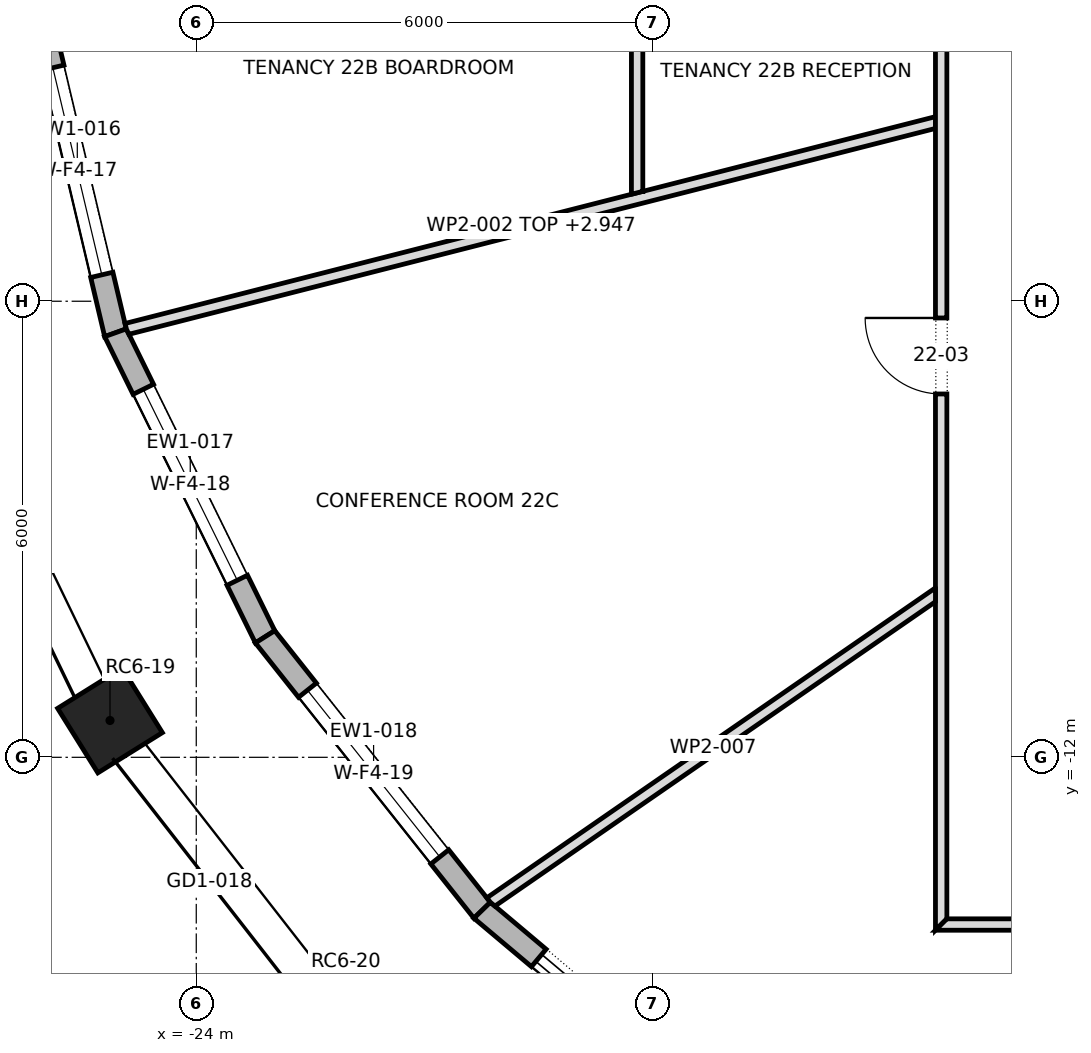
"""IFC4 building model, lengths in metres.
Left out: names, types, materials, properties, quantities, classifications, styles, units other than length and angle.
Written with IfcOpenShell. Run it as: python <this file> out.ifc"""

import sys

from ifc_helpers import new_model, si_unit, direction, frame, frame_2d, origin, origin_2d, place, context, subcontext, project, spatial, polyline, rectangle, outline, extrude, element, fill, save


model = new_model("IFC4")
c1 = context("Model", 3, precision=1e-05, world=origin(), true_north=direction((0.0, 1.0)))
c2 = subcontext(c1, "Body", "Model", "MODEL_VIEW")
j1 = project(units=[si_unit("LENGTHUNIT", "METRE"), si_unit("PLANEANGLEUNIT", "RADIAN")], contexts=[c1])
p1 = place(None, origin())
s1 = spatial("IfcSite", under=j1, at=p1, CompositionType="ELEMENT")
p2 = place(p1, origin())
s2 = spatial("IfcBuilding", under=s1, at=p2, CompositionType="ELEMENT")
p3 = place(p2, frame((0.0, 0.0, 312.3)))
s3 = spatial("IfcBuildingStorey", under=s2, at=p3, CompositionType="ELEMENT", Elevation=312.3)
for number, where, z_axis, x_axis in (
    (1, (-25.135, -11.516, 0.0), (0.0, 0.0, 1.0), (0.529, -0.849, 0.0)),
    (2, (-22.031, -15.497, 0.0), (0.0, 0.0, 1.0), (0.692, -0.722, 0.0)),
):
    element("IfcColumn", number, at=place(p3, frame(where, z_axis=z_axis, x_axis=x_axis)), inside=s3, PredefinedType="COLUMN", context=c2, shape_type="SweptSolid", body=[
        extrude(rectangle(XDim=1.0, YDim=1.0, at=origin_2d()), origin(), (0.0, 0.0, 1.0), 4.0),
    ])
p4 = place(p3, frame((-26.067, -2.166, 0.0), z_axis=(0.0, 0.0, 1.0), x_axis=(0.229974411334, -0.973196675977, 0.0)))
e3 = element("IfcWall", 3, at=p4, inside=s3, PredefinedType="STANDARD", context=c2, shape_type="SweptSolid", body=[
    extrude(outline(polyline([(-0.018, -0.15), (4.382, -0.15), (4.348, 0.15), (0.018, 0.15), (-0.018, -0.15)])), origin(), (0.0, 0.0, 1.0), 3.7),
])
p5 = place(p4, frame((0.783, 0.0, 0.6)))
e4 = element("IfcOpeningElement", 4, at=p5, cuts=e3, PredefinedType="OPENING", context=c2, shape_type="SweptSolid", body=[
    extrude(rectangle(XDim=2.8, YDim=2.65, at=frame_2d((1.4, 1.325))), frame((0.0, 0.162, 0.0), z_axis=(0.0, -1.0, 0.0), x_axis=(1.0, 0.0, 0.0)), (0.0, 0.0, 1.0), 0.324),
])
p6 = place(p3, frame((-25.063, -6.415, 0.0), z_axis=(0.0, 0.0, 1.0), x_axis=(0.441509050872, -0.897256796017, 0.0)))
e5 = element("IfcWall", 5, at=p6, inside=s3, PredefinedType="STANDARD", context=c2, shape_type="SweptSolid", body=[
    extrude(outline(polyline([(-0.017, -0.15), (4.474, -0.15), (4.442, 0.15), (0.017, 0.15), (-0.017, -0.15)])), origin(), (0.0, 0.0, 1.0), 3.7),
])
p7 = place(p6, frame((0.829, 0.0, 0.6)))
e6 = element("IfcOpeningElement", 6, at=p7, cuts=e5, PredefinedType="OPENING", context=c2, shape_type="SweptSolid", body=[
    extrude(rectangle(XDim=2.8, YDim=2.65, at=frame_2d((1.4, 1.325))), frame((0.0, 0.162, 0.0), z_axis=(0.0, -1.0, 0.0), x_axis=(1.0, 0.0, 0.0)), (0.0, 0.0, 1.0), 0.324),
])
p8 = place(p3, frame((-23.094, -10.415, 0.0), z_axis=(0.0, 0.0, 1.0), x_axis=(0.621682706372, -0.78326918272, 0.0)))
e7 = element("IfcWall", 7, at=p8, inside=s3, PredefinedType="STANDARD", context=c2, shape_type="SweptSolid", body=[
    extrude(outline(polyline([(-0.016, -0.15), (4.608, -0.15), (4.578, 0.15), (0.016, 0.15), (-0.016, -0.15)])), origin(), (0.0, 0.0, 1.0), 3.7),
])
p9 = place(p8, frame((0.896, 0.0, 0.6)))
e8 = element("IfcOpeningElement", 8, at=p9, cuts=e7, PredefinedType="OPENING", context=c2, shape_type="SweptSolid", body=[
    extrude(rectangle(XDim=2.8, YDim=2.65, at=frame_2d((1.4, 1.325))), frame((0.0, 0.162, 0.0), z_axis=(0.0, -1.0, 0.0), x_axis=(1.0, 0.0, 0.0)), (0.0, 0.0, 1.0), 0.324),
])
p10 = place(p3, frame((-20.239, -14.012, 0.0), z_axis=(0.0, 0.0, 1.0), x_axis=(0.765059193792, -0.643959959931, 0.0)))
e9 = element("IfcWall", 9, at=p10, inside=s3, PredefinedType="STANDARD", context=c2, shape_type="SweptSolid", body=[
    extrude(outline(polyline([(-0.015, -0.15), (4.762, -0.15), (4.734, 0.15), (0.015, 0.15), (-0.015, -0.15)])), origin(), (0.0, 0.0, 1.0), 3.7),
])
p11 = place(p10, frame((0.974, 0.0, 0.0)))
e10 = element("IfcOpeningElement", 10, at=p11, cuts=e9, PredefinedType="OPENING", context=c2, shape_type="SweptSolid", body=[
    extrude(rectangle(XDim=2.8, YDim=3.25, at=frame_2d((1.4, 1.625))), frame((0.0, 0.162, 0.0), z_axis=(0.0, -1.0, 0.0), x_axis=(1.0, 0.0, 0.0)), (0.0, 0.0, 1.0), 0.324),
])
p12 = place(p3, frame((-24.919, -6.365, 0.0), z_axis=(0.0, 0.0, 1.0), x_axis=(0.968945878768, 0.247272893819, 0.0)))
e11 = element("IfcWall", 11, at=p12, inside=s3, PredefinedType="PARTITIONING", context=c2, shape_type="SweptSolid", body=[
    extrude(outline(polyline([(0.015, -0.075), (1.84, -0.075), (3.665, -0.075), (5.49, -0.075), (7.315, -0.075), (9.141, -0.075), (10.966, -0.075), (11.004, 0.075), (11.004, 0.075), (9.017, 0.075), (7.031, 0.075), (7.031, 0.074), (7.028, 0.075), (5.271, 0.075), (3.514, 0.075), (1.757, 0.075), (0.0, 0.075), (0.0, -0.005), (0.015, -0.075)])), origin(), (0.0, 0.0, 1.0), 2.947),
])
p13 = place(p3, frame((-18.2, -4.593, 0.0), z_axis=(0.0, 0.0, 1.0), x_axis=(0.0, 1.0, 0.0)))
e12 = element("IfcWall", 12, at=p13, inside=s3, PredefinedType="PARTITIONING", context=c2, shape_type="SweptSolid", body=[
    extrude(outline(polyline([(0.038, -0.075), (2.032, -0.075), (4.026, -0.075), (6.021, -0.075), (6.032, 0.07), (6.032, 0.075), (4.524, 0.075), (3.016, 0.075), (1.508, 0.075), (0.0, 0.075), (0.0, 0.075), (0.038, -0.075)])), origin(), (0.0, 0.0, 1.0), 3.7),
])
p14 = place(p13, frame((2.522, 0.0, 0.0)))
e13 = element("IfcOpeningElement", 13, at=p14, cuts=e12, PredefinedType="OPENING", context=c2, shape_type="SweptSolid", body=[
    extrude(rectangle(XDim=1.0, YDim=2.1, at=frame_2d((0.5, 1.05))), frame((0.0, 0.087, 0.0), z_axis=(0.0, -1.0, 0.0), x_axis=(1.0, 0.0, 0.0)), (0.0, 0.0, 1.0), 0.174),
])
p15 = place(p3, frame((-14.2, -14.275, 0.0), z_axis=(0.0, 0.0, 1.0), x_axis=(0.0, 1.0, 0.0)))
e14 = element("IfcWall", 14, at=p15, inside=s3, PredefinedType="PARTITIONING", context=c2, shape_type="SweptSolid", body=[
    extrude(outline(polyline([(0.15, -0.075), (2.033, -0.075), (3.917, -0.075), (5.8, -0.075), (7.683, -0.075), (9.567, -0.075), (11.45, -0.075), (13.333, -0.075), (15.217, -0.075), (17.1, -0.075), (18.983, -0.075), (20.866, -0.075), (22.75, -0.075), (24.633, -0.075), (26.517, -0.075), (28.4, -0.075), (28.55, 0.075), (28.55, 0.075), (26.646, 0.075), (24.743, 0.075), (22.84, 0.075), (20.937, 0.075), (19.033, 0.075), (17.13, 0.075), (15.227, 0.075), (13.323, 0.075), (11.42, 0.075), (9.517, 0.075), (7.613, 0.075), (5.71, 0.075), (3.807, 0.075), (1.903, 0.075), (0.0, 0.075), (0.15, -0.075)])), origin(), (0.0, 0.0, 1.0), 3.7),
])
p16 = place(p15, frame((21.465, 0.0, 0.0)))
e15 = element("IfcOpeningElement", 15, at=p16, cuts=e14, PredefinedType="OPENING", context=c2, shape_type="SweptSolid", body=[
    extrude(rectangle(XDim=1.0, YDim=2.1, at=frame_2d((0.5, 1.05))), frame((0.0, 0.087, 0.0), z_axis=(0.0, -1.0, 0.0), x_axis=(1.0, 0.0, 0.0)), (0.0, 0.0, 1.0), 0.174),
])
p17 = place(p15, frame((12.55, 0.0, 0.0)))
e16 = element("IfcOpeningElement", 16, at=p17, cuts=e14, PredefinedType="OPENING", context=c2, shape_type="SweptSolid", body=[
    extrude(rectangle(XDim=1.0, YDim=2.1, at=frame_2d((0.5, 1.05))), frame((0.0, 0.087, 0.0), z_axis=(0.0, -1.0, 0.0), x_axis=(1.0, 0.0, 0.0)), (0.0, 0.0, 1.0), 0.174),
])
p18 = place(p15, frame((7.055, 0.0, 0.0)))
e17 = element("IfcOpeningElement", 17, at=p18, cuts=e14, PredefinedType="OPENING", context=c2, shape_type="SweptSolid", body=[
    extrude(rectangle(XDim=1.0, YDim=2.1, at=frame_2d((0.5, 1.05))), frame((0.0, 0.087, 0.0), z_axis=(0.0, -1.0, 0.0), x_axis=(1.0, 0.0, 0.0)), (0.0, 0.0, 1.0), 0.174),
])
p19 = place(p3, frame((-14.275, -14.2, 0.0), z_axis=(0.0, 0.0, 1.0), x_axis=(1.0, 0.0, 0.0)))
e18 = element("IfcWall", 18, at=p19, inside=s3, PredefinedType="PARTITIONING", context=c2, shape_type="SweptSolid", body=[
    extrude(outline(polyline([(28.55, -0.075), (28.55, -0.075), (28.4, 0.075), (26.517, 0.075), (24.633, 0.075), (22.75, 0.075), (20.866, 0.075), (18.983, 0.075), (17.1, 0.075), (15.217, 0.075), (13.333, 0.075), (11.45, 0.075), (9.567, 0.075), (7.683, 0.075), (5.8, 0.075), (3.917, 0.075), (2.033, 0.075), (0.15, 0.075), (0.0, -0.075), (1.903, -0.075), (3.807, -0.075), (5.71, -0.075), (7.613, -0.075), (9.517, -0.075), (11.42, -0.075), (13.323, -0.075), (15.227, -0.075), (17.13, -0.075), (19.033, -0.075), (20.937, -0.075), (22.84, -0.075), (24.743, -0.075), (26.646, -0.075), (28.55, -0.075)])), origin(), (0.0, 0.0, 1.0), 3.7),
])
p20 = place(p19, frame((2.165, 0.0, 0.0)))
e19 = element("IfcOpeningElement", 19, at=p20, cuts=e18, PredefinedType="OPENING", context=c2, shape_type="SweptSolid", body=[
    extrude(rectangle(XDim=1.0, YDim=2.1, at=frame_2d((0.5, 1.05))), frame((0.0, 0.087, 0.0), z_axis=(0.0, -1.0, 0.0), x_axis=(1.0, 0.0, 0.0)), (0.0, 0.0, 1.0), 0.174),
])
p21 = place(p19, frame((11.825, 0.0, 0.0)))
e20 = element("IfcOpeningElement", 20, at=p21, cuts=e18, PredefinedType="OPENING", context=c2, shape_type="SweptSolid", body=[
    extrude(rectangle(XDim=1.0, YDim=2.1, at=frame_2d((0.5, 1.05))), frame((0.0, 0.087, 0.0), z_axis=(0.0, -1.0, 0.0), x_axis=(1.0, 0.0, 0.0)), (0.0, 0.0, 1.0), 0.174),
])
p22 = place(p19, frame((23.255, 0.0, 0.0)))
e21 = element("IfcOpeningElement", 21, at=p22, cuts=e18, PredefinedType="OPENING", context=c2, shape_type="SweptSolid", body=[
    extrude(rectangle(XDim=1.0, YDim=2.1, at=frame_2d((0.5, 1.05))), frame((0.0, 0.087, 0.0), z_axis=(0.0, -1.0, 0.0), x_axis=(1.0, 0.0, 0.0)), (0.0, 0.0, 1.0), 0.174),
])
p23 = place(p3, frame((-14.232, -9.833, 0.0), z_axis=(0.0, 0.0, 1.0), x_axis=(-0.822725997435, -0.568438152436, 0.0)))
e22 = element("IfcWall", 22, at=p23, inside=s3, PredefinedType="PARTITIONING", context=c2, shape_type="SweptSolid", body=[
    extrude(outline(polyline([(0.0, -0.075), (1.793, -0.075), (3.587, -0.075), (5.38, -0.075), (7.174, -0.075), (7.169, -0.001), (7.148, 0.075), (5.387, 0.075), (3.626, 0.075), (1.865, 0.075), (0.104, 0.075), (0.0, -0.075), (0.0, -0.075)])), origin(), (0.0, 0.0, 1.0), 3.7),
])
p24 = place(p5, origin())
e23 = element("IfcWindow", 23, at=p24, inside=s3, PartitioningType="DOUBLE_PANEL_VERTICAL", PredefinedType="WINDOW", context=c2, shape_type="SweptSolid", body=[
    extrude(rectangle(XDim=2.8, YDim=2.65, at=frame_2d((1.4, 1.325))), frame((0.0, 0.03, 0.0), z_axis=(0.0, -1.0, 0.0), x_axis=(1.0, 0.0, 0.0)), (0.0, 0.0, 1.0), 0.06),
])
fill(e4, e23)
p25 = place(p7, origin())
e24 = element("IfcWindow", 24, at=p25, inside=s3, PartitioningType="DOUBLE_PANEL_VERTICAL", PredefinedType="WINDOW", context=c2, shape_type="SweptSolid", body=[
    extrude(rectangle(XDim=2.8, YDim=2.65, at=frame_2d((1.4, 1.325))), frame((0.0, 0.03, 0.0), z_axis=(0.0, -1.0, 0.0), x_axis=(1.0, 0.0, 0.0)), (0.0, 0.0, 1.0), 0.06),
])
fill(e6, e24)
p26 = place(p9, origin())
e25 = element("IfcWindow", 25, at=p26, inside=s3, PartitioningType="DOUBLE_PANEL_VERTICAL", PredefinedType="WINDOW", context=c2, shape_type="SweptSolid", body=[
    extrude(rectangle(XDim=2.8, YDim=2.65, at=frame_2d((1.4, 1.325))), frame((0.0, 0.03, 0.0), z_axis=(0.0, -1.0, 0.0), x_axis=(1.0, 0.0, 0.0)), (0.0, 0.0, 1.0), 0.06),
])
fill(e8, e25)
p27 = place(p11, origin())
e26 = element("IfcDoor", 26, at=p27, inside=s3, OperationType="DOUBLE_DOOR_SLIDING", PredefinedType="DOOR", context=c2, shape_type="SweptSolid", body=[
    extrude(rectangle(XDim=2.8, YDim=3.25, at=frame_2d((1.4, 1.625))), frame((0.0, 0.025, 0.0), z_axis=(0.0, -1.0, 0.0), x_axis=(1.0, 0.0, 0.0)), (0.0, 0.0, 1.0), 0.05),
])
fill(e10, e26)
p28 = place(p18, origin())
e27 = element("IfcDoor", 27, at=p28, inside=s3, OperationType="SINGLE_SWING_LEFT", PredefinedType="DOOR", context=c2, shape_type="SweptSolid", body=[
    extrude(rectangle(XDim=1.0, YDim=2.1, at=frame_2d((0.5, 1.05))), frame((0.0, 0.025, 0.0), z_axis=(0.0, -1.0, 0.0), x_axis=(1.0, 0.0, 0.0)), (0.0, 0.0, 1.0), 0.05),
])
fill(e17, e27)
save(model, sys.argv[1])
